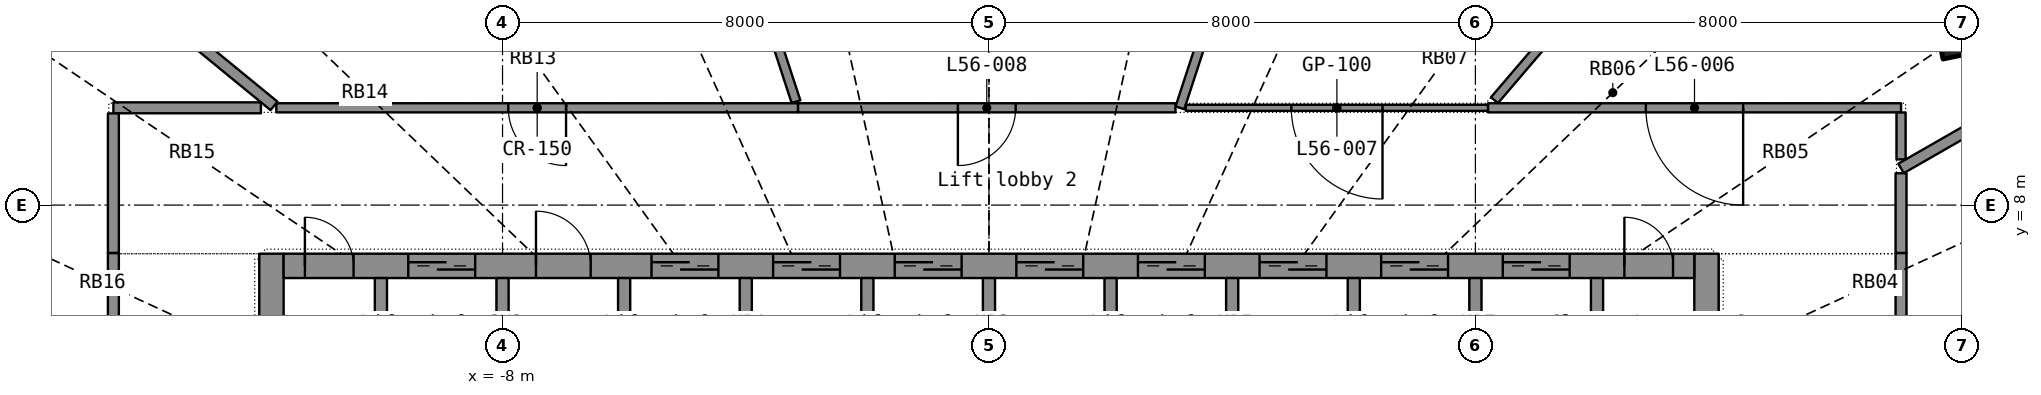
"""IFC4 building model, lengths in metres.
Left out: names, types, materials, properties, quantities, classifications, styles, units other than length and angle.
Written with IfcOpenShell. Run it as: python <this file> out.ifc"""

import sys

from ifc_helpers import new_model, si_unit, direction, frame, frame_2d, origin, origin_2d, place, context, subcontext, project, spatial, rectangle, hollow_rectangle, extrude, element, fill, save


model = new_model("IFC4")
c1 = context("Model", 3, precision=1e-05, world=origin(), true_north=direction((0.0, 1.0)))
c2 = subcontext(c1, "Body", "Model", "MODEL_VIEW")
j1 = project(units=[si_unit("LENGTHUNIT", "METRE"), si_unit("PLANEANGLEUNIT", "RADIAN")], contexts=[c1])
p1 = place(None, origin())
s1 = spatial("IfcSite", under=j1, at=p1, CompositionType="ELEMENT")
p2 = place(p1, origin())
s2 = spatial("IfcBuilding", under=s1, at=p2, CompositionType="ELEMENT")
p3 = place(p2, frame((0.0, 0.0, 231.9)))
s3 = spatial("IfcBuildingStorey", under=s2, at=p3, CompositionType="ELEMENT", Elevation=231.9)
p4 = place(p3, frame((15.923, 10.756, 0.0), z_axis=(-0.026510431, -0.018201192, 0.999482823), x_axis=(0.720757976, -0.693156374, 0.006494692)))
e1 = element("IfcColumn", 1, at=p4, inside=s3, PredefinedType="COLUMN", context=c2, shape_type="SweptSolid", body=[
    extrude(hollow_rectangle(XDim=0.6, YDim=0.6, WallThickness=0.025, at=origin_2d()), origin(), (0.0, 0.0, 1.0), 3.702),
])
p5 = place(p3, frame((-11.8, -7.2, 0.0), z_axis=(0.0, 0.0, 1.0), x_axis=(0.0, 1.0, 0.0)))
e2 = element("IfcWall", 2, at=p5, inside=s3, PredefinedType="SHEAR", context=c2, shape_type="SweptSolid", body=[
    extrude(rectangle(XDim=14.4, YDim=0.4, at=frame_2d((7.2, 0.0))), origin(), (0.0, 0.0, 1.0), 3.3),
])
p6 = place(p5, frame((6.5, 0.0, 0.0)))
e3 = element("IfcOpeningElement", 3, at=p6, cuts=e2, PredefinedType="OPENING", context=c2, shape_type="SweptSolid", body=[
    extrude(rectangle(XDim=1.4, YDim=2.2, at=frame_2d((0.7, 1.1))), frame((0.0, 0.21, 0.0), z_axis=(0.0, -1.0, 0.0), x_axis=(1.0, 0.0, 0.0)), (0.0, 0.0, 1.0), 0.42),
])
p7 = place(p3, frame((11.8, -7.2, 0.0), z_axis=(0.0, 0.0, 1.0), x_axis=(0.0, 1.0, 0.0)))
e4 = element("IfcWall", 4, at=p7, inside=s3, PredefinedType="SHEAR", context=c2, shape_type="SweptSolid", body=[
    extrude(rectangle(XDim=14.4, YDim=0.4, at=frame_2d((7.2, 0.0))), origin(), (0.0, 0.0, 1.0), 3.3),
])
p8 = place(p7, frame((6.5, 0.0, 0.0)))
e5 = element("IfcOpeningElement", 5, at=p8, cuts=e4, PredefinedType="OPENING", context=c2, shape_type="SweptSolid", body=[
    extrude(rectangle(XDim=1.4, YDim=2.2, at=frame_2d((0.7, 1.1))), frame((0.0, 0.21, 0.0), z_axis=(0.0, -1.0, 0.0), x_axis=(1.0, 0.0, 0.0)), (0.0, 0.0, 1.0), 0.42),
])
p9 = place(p3, frame((-11.6, 7.0, 0.0), z_axis=(0.0, 0.0, 1.0), x_axis=(1.0, 0.0, 0.0)))
e6 = element("IfcWall", 6, at=p9, inside=s3, PredefinedType="SHEAR", context=c2, shape_type="SweptSolid", body=[
    extrude(rectangle(XDim=23.2, YDim=0.4, at=frame_2d((11.6, 0.0))), origin(), (0.0, 0.0, 1.0), 3.3),
])
p10 = place(p9, frame((2.05, 0.0, 0.0)))
e7 = element("IfcOpeningElement", 7, at=p10, cuts=e6, PredefinedType="OPENING", context=c2, shape_type="SweptSolid", body=[
    extrude(rectangle(XDim=1.1, YDim=2.2, at=frame_2d((0.55, 1.1))), frame((0.0, 0.21, 0.0), z_axis=(0.0, -1.0, 0.0), x_axis=(1.0, 0.0, 0.0)), (0.0, 0.0, 1.0), 0.42),
])
p11 = place(p9, frame((6.05, 0.0, 0.0)))
e8 = element("IfcOpeningElement", 8, at=p11, cuts=e6, PredefinedType="OPENING", context=c2, shape_type="SweptSolid", body=[
    extrude(rectangle(XDim=1.1, YDim=2.2, at=frame_2d((0.55, 1.1))), frame((0.0, 0.21, 0.0), z_axis=(0.0, -1.0, 0.0), x_axis=(1.0, 0.0, 0.0)), (0.0, 0.0, 1.0), 0.42),
])
p12 = place(p9, frame((8.05, 0.0, 0.0)))
e9 = element("IfcOpeningElement", 9, at=p12, cuts=e6, PredefinedType="OPENING", context=c2, shape_type="SweptSolid", body=[
    extrude(rectangle(XDim=1.1, YDim=2.2, at=frame_2d((0.55, 1.1))), frame((0.0, 0.21, 0.0), z_axis=(0.0, -1.0, 0.0), x_axis=(1.0, 0.0, 0.0)), (0.0, 0.0, 1.0), 0.42),
])
p13 = place(p9, frame((10.05, 0.0, 0.0)))
e10 = element("IfcOpeningElement", 10, at=p13, cuts=e6, PredefinedType="OPENING", context=c2, shape_type="SweptSolid", body=[
    extrude(rectangle(XDim=1.1, YDim=2.2, at=frame_2d((0.55, 1.1))), frame((0.0, 0.21, 0.0), z_axis=(0.0, -1.0, 0.0), x_axis=(1.0, 0.0, 0.0)), (0.0, 0.0, 1.0), 0.42),
])
p14 = place(p9, frame((12.05, 0.0, 0.0)))
e11 = element("IfcOpeningElement", 11, at=p14, cuts=e6, PredefinedType="OPENING", context=c2, shape_type="SweptSolid", body=[
    extrude(rectangle(XDim=1.1, YDim=2.2, at=frame_2d((0.55, 1.1))), frame((0.0, 0.21, 0.0), z_axis=(0.0, -1.0, 0.0), x_axis=(1.0, 0.0, 0.0)), (0.0, 0.0, 1.0), 0.42),
])
p15 = place(p9, frame((14.05, 0.0, 0.0)))
e12 = element("IfcOpeningElement", 12, at=p15, cuts=e6, PredefinedType="OPENING", context=c2, shape_type="SweptSolid", body=[
    extrude(rectangle(XDim=1.1, YDim=2.2, at=frame_2d((0.55, 1.1))), frame((0.0, 0.21, 0.0), z_axis=(0.0, -1.0, 0.0), x_axis=(1.0, 0.0, 0.0)), (0.0, 0.0, 1.0), 0.42),
])
p16 = place(p9, frame((16.05, 0.0, 0.0)))
e13 = element("IfcOpeningElement", 13, at=p16, cuts=e6, PredefinedType="OPENING", context=c2, shape_type="SweptSolid", body=[
    extrude(rectangle(XDim=1.1, YDim=2.2, at=frame_2d((0.55, 1.1))), frame((0.0, 0.21, 0.0), z_axis=(0.0, -1.0, 0.0), x_axis=(1.0, 0.0, 0.0)), (0.0, 0.0, 1.0), 0.42),
])
p17 = place(p9, frame((18.05, 0.0, 0.0)))
e14 = element("IfcOpeningElement", 14, at=p17, cuts=e6, PredefinedType="OPENING", context=c2, shape_type="SweptSolid", body=[
    extrude(rectangle(XDim=1.1, YDim=2.2, at=frame_2d((0.55, 1.1))), frame((0.0, 0.21, 0.0), z_axis=(0.0, -1.0, 0.0), x_axis=(1.0, 0.0, 0.0)), (0.0, 0.0, 1.0), 0.42),
])
p18 = place(p9, frame((20.05, 0.0, 0.0)))
e15 = element("IfcOpeningElement", 15, at=p18, cuts=e6, PredefinedType="OPENING", context=c2, shape_type="SweptSolid", body=[
    extrude(rectangle(XDim=1.1, YDim=2.2, at=frame_2d((0.55, 1.1))), frame((0.0, 0.21, 0.0), z_axis=(0.0, -1.0, 0.0), x_axis=(1.0, 0.0, 0.0)), (0.0, 0.0, 1.0), 0.42),
])
p19 = place(p9, frame((4.15, 0.0, 0.0)))
e16 = element("IfcOpeningElement", 16, at=p19, cuts=e6, PredefinedType="OPENING", context=c2, shape_type="SweptSolid", body=[
    extrude(rectangle(XDim=0.9, YDim=2.1, at=frame_2d((0.45, 1.05))), frame((0.0, 0.21, 0.0), z_axis=(0.0, -1.0, 0.0), x_axis=(1.0, 0.0, 0.0)), (0.0, 0.0, 1.0), 0.42),
])
p20 = place(p9, frame((0.35, 0.0, 0.0)))
e17 = element("IfcOpeningElement", 17, at=p20, cuts=e6, PredefinedType="OPENING", context=c2, shape_type="SweptSolid", body=[
    extrude(rectangle(XDim=0.8, YDim=2.05, at=frame_2d((0.4, 1.025))), frame((0.0, 0.21, 0.0), z_axis=(0.0, -1.0, 0.0), x_axis=(1.0, 0.0, 0.0)), (0.0, 0.0, 1.0), 0.42),
])
p21 = place(p9, frame((22.05, 0.0, 0.0)))
e18 = element("IfcOpeningElement", 18, at=p21, cuts=e6, PredefinedType="OPENING", context=c2, shape_type="SweptSolid", body=[
    extrude(rectangle(XDim=0.8, YDim=2.05, at=frame_2d((0.4, 1.025))), frame((0.0, 0.21, 0.0), z_axis=(0.0, -1.0, 0.0), x_axis=(1.0, 0.0, 0.0)), (0.0, 0.0, 1.0), 0.42),
])
for number, where, z_axis, x_axis in (
    (19, (-10.0, 3.9, 0.0), (0.0, 0.0, 1.0), (0.0, 1.0, 0.0)),
    (20, (-8.0, 3.9, 0.0), (0.0, 0.0, 1.0), (0.0, 1.0, 0.0)),
    (21, (-6.0, 3.9, 0.0), (0.0, 0.0, 1.0), (0.0, 1.0, 0.0)),
    (22, (-4.0, 3.9, 0.0), (0.0, 0.0, 1.0), (0.0, 1.0, 0.0)),
    (23, (-2.0, 3.9, 0.0), (0.0, 0.0, 1.0), (0.0, 1.0, 0.0)),
    (24, (0.0, 3.9, 0.0), (0.0, 0.0, 1.0), (0.0, 1.0, 0.0)),
    (25, (2.0, 3.9, 0.0), (0.0, 0.0, 1.0), (0.0, 1.0, 0.0)),
    (26, (4.0, 3.9, 0.0), (0.0, 0.0, 1.0), (0.0, 1.0, 0.0)),
    (27, (6.0, 3.9, 0.0), (0.0, 0.0, 1.0), (0.0, 1.0, 0.0)),
    (28, (8.0, 3.9, 0.0), (0.0, 0.0, 1.0), (0.0, 1.0, 0.0)),
    (29, (10.0, 3.9, 0.0), (0.0, 0.0, 1.0), (0.0, 1.0, 0.0)),
):
    element("IfcWall", number, at=place(p3, frame(where, z_axis=z_axis, x_axis=x_axis)), inside=s3, PredefinedType="SHEAR", context=c2, shape_type="SweptSolid", body=[
        extrude(rectangle(XDim=2.9, YDim=0.2, at=frame_2d((1.45, 0.0))), origin(), (0.0, 0.0, 1.0), 3.3),
    ])
p22 = place(p3, frame((-3.14, 9.6, 0.0), z_axis=(0.0, 0.0, 1.0), x_axis=(-1.0, 0.0, 0.0)))
e30 = element("IfcWall", 30, at=p22, inside=s3, PredefinedType="PARTITIONING", context=c2, shape_type="SweptSolid", body=[
    extrude(rectangle(XDim=8.58, YDim=0.15, at=frame_2d((4.29, 0.0))), origin(), (0.0, 0.0, 1.0), 2.4),
])
p23 = place(p22, frame((3.815, 0.0, 0.0)))
e31 = element("IfcOpeningElement", 31, at=p23, cuts=e30, PredefinedType="OPENING", context=c2, shape_type="SweptSolid", body=[
    extrude(rectangle(XDim=0.95, YDim=2.15, at=frame_2d((0.475, 1.075))), frame((0.0, 0.085, 0.0), z_axis=(0.0, -1.0, 0.0), x_axis=(1.0, 0.0, 0.0)), (0.0, 0.0, 1.0), 0.17),
])
p24 = place(p3, frame((-5.515, 16.859, 0.0), z_axis=(0.0, 0.0, 1.0), x_axis=(0.310923007, -0.950435102, 0.0)))
e32 = element("IfcWall", 32, at=p24, inside=s3, PredefinedType="PARTITIONING", context=c2, shape_type="SweptSolid", body=[
    extrude(rectangle(XDim=7.532, YDim=0.15, at=frame_2d((3.766, 0.0))), origin(), (0.0, 0.0, 1.0), 2.4),
])
p25 = place(p3, frame((5.515, 16.858, 0.0), z_axis=(0.0, 0.0, 1.0), x_axis=(-0.31091882, -0.950436472, 0.0)))
e33 = element("IfcWall", 33, at=p25, inside=s3, PredefinedType="PARTITIONING", context=c2, shape_type="SweptSolid", body=[
    extrude(rectangle(XDim=7.636, YDim=0.15, at=frame_2d((3.818, 0.0))), origin(), (0.0, 0.0, 1.0), 2.4),
])
p26 = place(p3, frame((15.0, 9.6, 0.0), z_axis=(0.0, 0.0, 1.0), x_axis=(-1.0, 0.0, 0.0)))
e34 = element("IfcWall", 34, at=p26, inside=s3, PredefinedType="PARTITIONING", context=c2, shape_type="SweptSolid", body=[
    extrude(rectangle(XDim=6.793, YDim=0.15, at=frame_2d((3.397, 0.0))), origin(), (0.0, 0.0, 1.0), 2.4),
])
p27 = place(p26, frame((2.597, 0.0, 0.0)))
e35 = element("IfcOpeningElement", 35, at=p27, cuts=e34, PredefinedType="OPENING", context=c2, shape_type="SweptSolid", body=[
    extrude(rectangle(XDim=1.6, YDim=2.4, at=frame_2d((0.8, 1.2))), frame((0.0, 0.085, 0.0), z_axis=(0.0, -1.0, 0.0), x_axis=(1.0, 0.0, 0.0)), (0.0, 0.0, 1.0), 0.17),
])
p28 = place(p3, frame((3.067, 9.6, 0.0), z_axis=(0.0, 0.0, 1.0), x_axis=(-1.0, 0.0, 0.0)))
e36 = element("IfcWall", 36, at=p28, inside=s3, PredefinedType="PARTITIONING", context=c2, shape_type="SweptSolid", body=[
    extrude(rectangle(XDim=6.207, YDim=0.15, at=frame_2d((3.103, 0.0))), origin(), (0.0, 0.0, 1.0), 2.4),
])
p29 = place(p28, frame((2.628, 0.0, 0.0)))
e37 = element("IfcOpeningElement", 37, at=p29, cuts=e36, PredefinedType="OPENING", context=c2, shape_type="SweptSolid", body=[
    extrude(rectangle(XDim=0.95, YDim=2.15, at=frame_2d((0.475, 1.075))), frame((0.0, 0.085, 0.0), z_axis=(0.0, -1.0, 0.0), x_axis=(1.0, 0.0, 0.0)), (0.0, 0.0, 1.0), 0.17),
])
p30 = place(p3, frame((12.224, 14.3, 0.0), z_axis=(0.0, 0.0, 1.0), x_axis=(-0.649785307, -0.76011779, 0.0)))
e38 = element("IfcWall", 38, at=p30, inside=s3, PredefinedType="PARTITIONING", context=c2, shape_type="SweptSolid", body=[
    extrude(rectangle(XDim=6.019, YDim=0.15, at=frame_2d((3.009, 0.0))), origin(), (0.0, 0.0, 1.0), 2.4),
])
p31 = place(p3, frame((-14.4, 7.212, 0.0), z_axis=(0.0, 0.0, 1.0), x_axis=(0.0, -1.0, 0.0)))
e39 = element("IfcWall", 39, at=p31, inside=s3, PredefinedType="PARTITIONING", context=c2, shape_type="SweptSolid", body=[
    extrude(rectangle(XDim=5.712, YDim=0.18, at=frame_2d((2.856, 0.0))), origin(), (0.0, 0.0, 1.0), 2.4),
])
p32 = place(p31, frame((2.356, 0.0, 0.0)))
e40 = element("IfcOpeningElement", 40, at=p32, cuts=e39, PredefinedType="OPENING", context=c2, shape_type="SweptSolid", body=[
    extrude(rectangle(XDim=1.0, YDim=2.1, at=frame_2d((0.5, 1.05))), frame((0.0, 0.1, 0.0), z_axis=(0.0, -1.0, 0.0), x_axis=(1.0, 0.0, 0.0)), (0.0, 0.0, 1.0), 0.2),
])
p33 = place(p3, frame((15.0, 1.5, 0.0), z_axis=(0.0, 0.0, 1.0), x_axis=(0.0, 1.0, 0.0)))
e41 = element("IfcWall", 41, at=p33, inside=s3, PredefinedType="PARTITIONING", context=c2, shape_type="SweptSolid", body=[
    extrude(rectangle(XDim=5.712, YDim=0.18, at=frame_2d((2.856, 0.0))), origin(), (0.0, 0.0, 1.0), 2.4),
])
p34 = place(p33, frame((2.356, 0.0, 0.0)))
e42 = element("IfcOpeningElement", 42, at=p34, cuts=e41, PredefinedType="OPENING", context=c2, shape_type="SweptSolid", body=[
    extrude(rectangle(XDim=1.0, YDim=2.1, at=frame_2d((0.5, 1.05))), frame((0.0, 0.1, 0.0), z_axis=(0.0, -1.0, 0.0), x_axis=(1.0, 0.0, 0.0)), (0.0, 0.0, 1.0), 0.2),
])
p35 = place(p3, frame((8.207, 9.6, 0.0), z_axis=(0.0, 0.0, 1.0), x_axis=(-1.0, 0.0, 0.0)))
e43 = element("IfcWall", 43, at=p35, inside=s3, PredefinedType="PARTITIONING", context=c2, shape_type="SweptSolid", body=[
    extrude(rectangle(XDim=4.969, YDim=0.1, at=frame_2d((2.484, 0.0))), origin(), (0.0, 0.0, 1.0), 2.4),
])
p36 = place(p35, frame((1.734, 0.0, 0.0)))
e44 = element("IfcOpeningElement", 44, at=p36, cuts=e43, PredefinedType="OPENING", context=c2, shape_type="SweptSolid", body=[
    extrude(rectangle(XDim=1.5, YDim=2.4, at=frame_2d((0.75, 1.2))), frame((0.0, 0.06, 0.0), z_axis=(0.0, -1.0, 0.0), x_axis=(1.0, 0.0, 0.0)), (0.0, 0.0, 1.0), 0.12),
])
p37 = place(p3, frame((-15.075, 12.348, 0.0), z_axis=(0.0, 0.0, 1.0), x_axis=(0.773594361, -0.633681122, 0.0)))
e45 = element("IfcWall", 45, at=p37, inside=s3, PredefinedType="PARTITIONING", context=c2, shape_type="SweptSolid", body=[
    extrude(rectangle(XDim=4.287, YDim=0.18, at=frame_2d((2.144, 0.0))), origin(), (0.0, 0.0, 1.0), 2.4),
])
p38 = place(p3, frame((17.466, 10.017, 0.0), z_axis=(0.0, 0.0, 1.0), x_axis=(-0.867459752, -0.497507365, 0.0)))
e46 = element("IfcWall", 46, at=p38, inside=s3, PredefinedType="PARTITIONING", context=c2, shape_type="SweptSolid", body=[
    extrude(rectangle(XDim=2.842, YDim=0.18, at=frame_2d((1.421, 0.0))), origin(), (0.0, 0.0, 1.0), 2.4),
])
p39 = place(p3, frame((-11.974, 9.6, 0.0), z_axis=(0.0, 0.0, 1.0), x_axis=(-1.0, 0.0, 0.0)))
e47 = element("IfcWall", 47, at=p39, inside=s3, PredefinedType="PARTITIONING", context=c2, shape_type="SweptSolid", body=[
    extrude(rectangle(XDim=2.426, YDim=0.18, at=frame_2d((1.213, 0.0))), origin(), (0.0, 0.0, 1.0), 2.4),
])
p40 = place(p3, frame((-14.4, 9.508, 0.0), z_axis=(0.0, 0.0, 1.0), x_axis=(0.0, -1.0, 0.0)))
e48 = element("IfcWall", 48, at=p40, inside=s3, PredefinedType="PARTITIONING", context=c2, shape_type="SweptSolid", body=[
    extrude(rectangle(XDim=2.295, YDim=0.18, at=frame_2d((1.147, 0.0))), origin(), (0.0, 0.0, 1.0), 2.4),
])
p41 = place(p3, frame((15.0, 7.213, 0.0), z_axis=(0.0, 0.0, 1.0), x_axis=(0.0, 1.0, 0.0)))
e49 = element("IfcWall", 49, at=p41, inside=s3, PredefinedType="PARTITIONING", context=c2, shape_type="SweptSolid", body=[
    extrude(rectangle(XDim=1.31, YDim=0.18, at=frame_2d((0.655, 0.0))), origin(), (0.0, 0.0, 1.0), 2.4),
])
p42 = place(p3, frame((15.0, 8.752, 0.0), z_axis=(0.0, 0.0, 1.0), x_axis=(0.0, 1.0, 0.0)))
e50 = element("IfcWall", 50, at=p42, inside=s3, PredefinedType="PARTITIONING", context=c2, shape_type="SweptSolid", body=[
    extrude(rectangle(XDim=0.771, YDim=0.15, at=frame_2d((0.385, 0.0))), origin(), (0.0, 0.0, 1.0), 2.4),
])
p43 = place(p10, origin())
e51 = element("IfcDoor", 51, at=p43, inside=s3, OperationType="DOUBLE_DOOR_SLIDING", PredefinedType="DOOR", context=c2, shape_type="SweptSolid", body=[
    extrude(rectangle(XDim=1.1, YDim=2.2, at=frame_2d((0.55, 1.1))), frame((0.0, 0.025, 0.0), z_axis=(0.0, -1.0, 0.0), x_axis=(1.0, 0.0, 0.0)), (0.0, 0.0, 1.0), 0.05),
])
fill(e7, e51)
p44 = place(p11, origin())
e52 = element("IfcDoor", 52, at=p44, inside=s3, OperationType="DOUBLE_DOOR_SLIDING", PredefinedType="DOOR", context=c2, shape_type="SweptSolid", body=[
    extrude(rectangle(XDim=1.1, YDim=2.2, at=frame_2d((0.55, 1.1))), frame((0.0, 0.025, 0.0), z_axis=(0.0, -1.0, 0.0), x_axis=(1.0, 0.0, 0.0)), (0.0, 0.0, 1.0), 0.05),
])
fill(e8, e52)
p45 = place(p12, origin())
e53 = element("IfcDoor", 53, at=p45, inside=s3, OperationType="DOUBLE_DOOR_SLIDING", PredefinedType="DOOR", context=c2, shape_type="SweptSolid", body=[
    extrude(rectangle(XDim=1.1, YDim=2.2, at=frame_2d((0.55, 1.1))), frame((0.0, 0.025, 0.0), z_axis=(0.0, -1.0, 0.0), x_axis=(1.0, 0.0, 0.0)), (0.0, 0.0, 1.0), 0.05),
])
fill(e9, e53)
p46 = place(p13, origin())
e54 = element("IfcDoor", 54, at=p46, inside=s3, OperationType="DOUBLE_DOOR_SLIDING", PredefinedType="DOOR", context=c2, shape_type="SweptSolid", body=[
    extrude(rectangle(XDim=1.1, YDim=2.2, at=frame_2d((0.55, 1.1))), frame((0.0, 0.025, 0.0), z_axis=(0.0, -1.0, 0.0), x_axis=(1.0, 0.0, 0.0)), (0.0, 0.0, 1.0), 0.05),
])
fill(e10, e54)
p47 = place(p14, origin())
e55 = element("IfcDoor", 55, at=p47, inside=s3, OperationType="DOUBLE_DOOR_SLIDING", PredefinedType="DOOR", context=c2, shape_type="SweptSolid", body=[
    extrude(rectangle(XDim=1.1, YDim=2.2, at=frame_2d((0.55, 1.1))), frame((0.0, 0.025, 0.0), z_axis=(0.0, -1.0, 0.0), x_axis=(1.0, 0.0, 0.0)), (0.0, 0.0, 1.0), 0.05),
])
fill(e11, e55)
p48 = place(p15, origin())
e56 = element("IfcDoor", 56, at=p48, inside=s3, OperationType="DOUBLE_DOOR_SLIDING", PredefinedType="DOOR", context=c2, shape_type="SweptSolid", body=[
    extrude(rectangle(XDim=1.1, YDim=2.2, at=frame_2d((0.55, 1.1))), frame((0.0, 0.025, 0.0), z_axis=(0.0, -1.0, 0.0), x_axis=(1.0, 0.0, 0.0)), (0.0, 0.0, 1.0), 0.05),
])
fill(e12, e56)
p49 = place(p16, origin())
e57 = element("IfcDoor", 57, at=p49, inside=s3, OperationType="DOUBLE_DOOR_SLIDING", PredefinedType="DOOR", context=c2, shape_type="SweptSolid", body=[
    extrude(rectangle(XDim=1.1, YDim=2.2, at=frame_2d((0.55, 1.1))), frame((0.0, 0.025, 0.0), z_axis=(0.0, -1.0, 0.0), x_axis=(1.0, 0.0, 0.0)), (0.0, 0.0, 1.0), 0.05),
])
fill(e13, e57)
p50 = place(p17, origin())
e58 = element("IfcDoor", 58, at=p50, inside=s3, OperationType="DOUBLE_DOOR_SLIDING", PredefinedType="DOOR", context=c2, shape_type="SweptSolid", body=[
    extrude(rectangle(XDim=1.1, YDim=2.2, at=frame_2d((0.55, 1.1))), frame((0.0, 0.025, 0.0), z_axis=(0.0, -1.0, 0.0), x_axis=(1.0, 0.0, 0.0)), (0.0, 0.0, 1.0), 0.05),
])
fill(e14, e58)
p51 = place(p18, origin())
e59 = element("IfcDoor", 59, at=p51, inside=s3, OperationType="DOUBLE_DOOR_SLIDING", PredefinedType="DOOR", context=c2, shape_type="SweptSolid", body=[
    extrude(rectangle(XDim=1.1, YDim=2.2, at=frame_2d((0.55, 1.1))), frame((0.0, 0.025, 0.0), z_axis=(0.0, -1.0, 0.0), x_axis=(1.0, 0.0, 0.0)), (0.0, 0.0, 1.0), 0.05),
])
fill(e15, e59)
p52 = place(p19, origin())
e60 = element("IfcDoor", 60, at=p52, inside=s3, OperationType="SINGLE_SWING_LEFT", PredefinedType="DOOR", context=c2, shape_type="SweptSolid", body=[
    extrude(rectangle(XDim=0.9, YDim=2.1, at=frame_2d((0.45, 1.05))), frame((0.0, 0.025, 0.0), z_axis=(0.0, -1.0, 0.0), x_axis=(1.0, 0.0, 0.0)), (0.0, 0.0, 1.0), 0.05),
])
fill(e16, e60)
p53 = place(p20, origin())
e61 = element("IfcDoor", 61, at=p53, inside=s3, OperationType="SINGLE_SWING_LEFT", PredefinedType="DOOR", context=c2, shape_type="SweptSolid", body=[
    extrude(rectangle(XDim=0.8, YDim=2.05, at=frame_2d((0.4, 1.025))), frame((0.0, 0.025, 0.0), z_axis=(0.0, -1.0, 0.0), x_axis=(1.0, 0.0, 0.0)), (0.0, 0.0, 1.0), 0.05),
])
fill(e17, e61)
p54 = place(p21, origin())
e62 = element("IfcDoor", 62, at=p54, inside=s3, OperationType="SINGLE_SWING_LEFT", PredefinedType="DOOR", context=c2, shape_type="SweptSolid", body=[
    extrude(rectangle(XDim=0.8, YDim=2.05, at=frame_2d((0.4, 1.025))), frame((0.0, 0.025, 0.0), z_axis=(0.0, -1.0, 0.0), x_axis=(1.0, 0.0, 0.0)), (0.0, 0.0, 1.0), 0.05),
])
fill(e18, e62)
p55 = place(p27, origin())
e63 = element("IfcDoor", 63, at=p55, inside=s3, OperationType="DOUBLE_DOOR_SINGLE_SWING", PredefinedType="DOOR", context=c2, shape_type="SweptSolid", body=[
    extrude(rectangle(XDim=1.6, YDim=2.4, at=frame_2d((0.8, 1.2))), frame((0.0, 0.025, 0.0), z_axis=(0.0, -1.0, 0.0), x_axis=(1.0, 0.0, 0.0)), (0.0, 0.0, 1.0), 0.05),
])
fill(e35, e63)
p56 = place(p36, origin())
e64 = element("IfcDoor", 64, at=p56, inside=s3, OperationType="DOUBLE_DOOR_SINGLE_SWING", PredefinedType="DOOR", context=c2, shape_type="SweptSolid", body=[
    extrude(rectangle(XDim=1.5, YDim=2.4, at=frame_2d((0.75, 1.2))), frame((0.0, 0.025, 0.0), z_axis=(0.0, -1.0, 0.0), x_axis=(1.0, 0.0, 0.0)), (0.0, 0.0, 1.0), 0.05),
])
fill(e44, e64)
p57 = place(p29, origin())
e65 = element("IfcDoor", 65, at=p57, inside=s3, OperationType="SINGLE_SWING_RIGHT", PredefinedType="DOOR", context=c2, shape_type="SweptSolid", body=[
    extrude(rectangle(XDim=0.95, YDim=2.15, at=frame_2d((0.475, 1.075))), frame((0.0, 0.025, 0.0), z_axis=(0.0, -1.0, 0.0), x_axis=(1.0, 0.0, 0.0)), (0.0, 0.0, 1.0), 0.05),
])
fill(e37, e65)
p58 = place(p23, origin())
e66 = element("IfcDoor", 66, at=p58, inside=s3, OperationType="SINGLE_SWING_LEFT", PredefinedType="DOOR", context=c2, shape_type="SweptSolid", body=[
    extrude(rectangle(XDim=0.95, YDim=2.15, at=frame_2d((0.475, 1.075))), frame((0.0, 0.025, 0.0), z_axis=(0.0, -1.0, 0.0), x_axis=(1.0, 0.0, 0.0)), (0.0, 0.0, 1.0), 0.05),
])
fill(e31, e66)
save(model, sys.argv[1])
